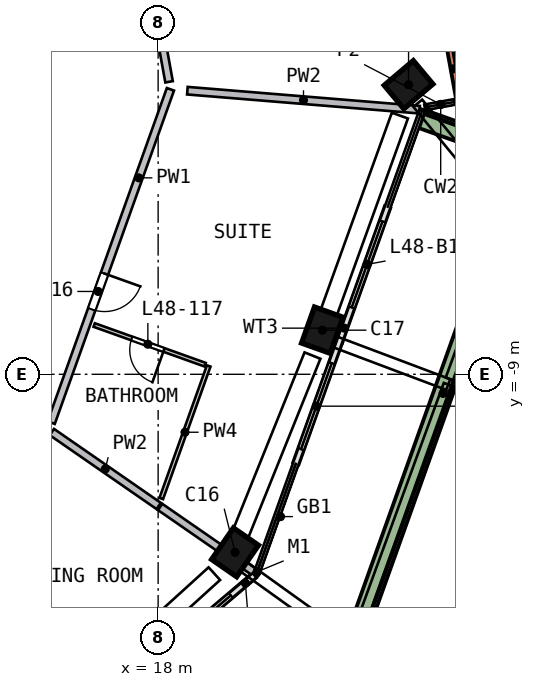
"""IFC4 building model, lengths in metres.
Left out: names, types, materials, properties, quantities, classifications, styles, units other than length and angle.
Written with IfcOpenShell. Run it as: python <this file> out.ifc"""

import sys

from ifc_helpers import new_model, si_unit, direction, frame, frame_2d, origin, origin_2d, place, context, subcontext, project, spatial, rectangle, extrude, element, fill, save


model = new_model("IFC4")
c1 = context("Model", 3, precision=1e-05, world=origin(), true_north=direction((0.0, 1.0)))
c2 = subcontext(c1, "Body", "Model", "MODEL_VIEW")
j1 = project(units=[si_unit("LENGTHUNIT", "METRE"), si_unit("PLANEANGLEUNIT", "RADIAN")], contexts=[c1])
p1 = place(None, origin())
s1 = spatial("IfcSite", under=j1, at=p1, CompositionType="ELEMENT")
p2 = place(p1, origin())
s2 = spatial("IfcBuilding", under=s1, at=p2, CompositionType="ELEMENT")
p3 = place(p2, frame((0.0, 0.0, 197.5)))
s3 = spatial("IfcBuildingStorey", under=s2, at=p3, CompositionType="ELEMENT", Elevation=197.5)
p4 = place(p3, frame((19.946, -13.801, 0.0), z_axis=(0.064772376, 0.095410014, 0.99332848), x_axis=(-0.56488901, -0.817069655, 0.115315158)))
e1 = element("IfcColumn", 1, at=p4, inside=s3, PredefinedType="COLUMN", context=c2, shape_type="SweptSolid", body=[
    extrude(rectangle(XDim=1.0, YDim=0.8, at=origin_2d()), origin(), (0.0, 0.0, 1.0), 3.211),
])
p5 = place(p3, frame((22.276, -7.967, 0.0), z_axis=(0.037035652, 0.106239847, 0.99365057), x_axis=(0.33503593, 0.935464206, -0.112506199)))
e2 = element("IfcColumn", 2, at=p5, inside=s3, PredefinedType="COLUMN", context=c2, shape_type="SweptSolid", body=[
    extrude(rectangle(XDim=1.0, YDim=0.8, at=origin_2d()), origin(), (0.0, 0.0, 1.0), 3.21),
])
p6 = place(p3, frame((24.582, -1.521, 0.0), z_axis=(0.006232678, 0.116900718, 0.993124049), x_axis=(-0.764322175, -0.639838763, 0.080112233)))
e3 = element("IfcColumn", 3, at=p6, inside=s3, PredefinedType="COLUMN", context=c2, shape_type="SweptSolid", body=[
    extrude(rectangle(XDim=1.0, YDim=0.8, at=origin_2d()), origin(), (0.0, 0.0, 1.0), 3.212),
])
p7 = place(p3, frame((25.94, -1.883, 0.0), z_axis=(0.0, 0.0, 1.0), x_axis=(-0.179160422, 0.983819873, 0.0)))
e4 = element("IfcWall", 4, at=p7, inside=s3, PredefinedType="SOLIDWALL", context=c2, shape_type="SweptSolid", body=[
    extrude(rectangle(XDim=1.875, YDim=0.15, at=frame_2d((0.938, 0.0))), origin(), (0.0, 0.0, 1.0), 3.19),
])
p8 = place(p3, frame((17.776, -16.632, 0.0), z_axis=(0.0, 0.0, 1.0), x_axis=(0.762428215, 0.647072806, 0.0)))
e5 = element("IfcWall", 5, at=p8, inside=s3, PredefinedType="SOLIDWALL", context=c2, shape_type="SweptSolid", body=[
    extrude(rectangle(XDim=3.608, YDim=0.15, at=frame_2d((1.804, 0.0))), origin(), (0.0, 0.0, 1.0), 2.475),
])
p9 = place(p8, frame((0.4, 0.0, 0.0)))
e6 = element("IfcOpeningElement", 6, at=p9, cuts=e5, PredefinedType="OPENING", context=c2, shape_type="SweptSolid", body=[
    extrude(rectangle(XDim=2.4, YDim=2.4, at=frame_2d((1.2, 1.2))), frame((0.0, 0.085, 0.0), z_axis=(0.0, -1.0, 0.0), x_axis=(1.0, 0.0, 0.0)), (0.0, 0.0, 1.0), 0.17),
])
p10 = place(p3, frame((21.626, -11.345, 0.0), z_axis=(0.0, 0.0, 1.0), x_axis=(0.336768495, 0.941587479, 0.0)))
e7 = element("IfcWall", 7, at=p10, inside=s3, PredefinedType="SOLIDWALL", context=c2, shape_type="SweptSolid", body=[
    extrude(rectangle(XDim=3.4, YDim=0.15, at=frame_2d((1.7, 0.0))), origin(), (0.0, 0.0, 1.0), 2.475),
])
p11 = place(p10, frame((0.4, 0.0, 0.0)))
e8 = element("IfcOpeningElement", 8, at=p11, cuts=e7, PredefinedType="OPENING", context=c2, shape_type="SweptSolid", body=[
    extrude(rectangle(XDim=2.4, YDim=2.4, at=frame_2d((1.2, 1.2))), frame((0.0, 0.085, 0.0), z_axis=(0.0, -1.0, 0.0), x_axis=(1.0, 0.0, 0.0)), (0.0, 0.0, 1.0), 0.17),
])
p12 = place(p3, frame((22.771, -8.144, 0.0), z_axis=(0.0, 0.0, 1.0), x_axis=(0.336755785, 0.941592025, 0.0)))
e9 = element("IfcWall", 9, at=p12, inside=s3, PredefinedType="SOLIDWALL", context=c2, shape_type="SweptSolid", body=[
    extrude(rectangle(XDim=3.761, YDim=0.15, at=frame_2d((1.881, 0.0))), origin(), (0.0, 0.0, 1.0), 2.475),
])
p13 = place(p12, frame((0.961, 0.0, 0.0)))
e10 = element("IfcOpeningElement", 10, at=p13, cuts=e9, PredefinedType="OPENING", context=c2, shape_type="SweptSolid", body=[
    extrude(rectangle(XDim=2.4, YDim=2.4, at=frame_2d((1.2, 1.2))), frame((0.0, 0.085, 0.0), z_axis=(0.0, -1.0, 0.0), x_axis=(1.0, 0.0, 0.0)), (0.0, 0.0, 1.0), 0.17),
])
p14 = place(p3, frame((23.187, -15.964, 0.0), z_axis=(0.0, 0.0, 1.0), x_axis=(0.33676461, 0.941588869, 0.0)))
e11 = element("IfcWall", 11, at=p14, inside=s3, PredefinedType="SOLIDWALL", context=c2, shape_type="SweptSolid", body=[
    extrude(rectangle(XDim=13.723, YDim=0.5, at=frame_2d((6.862, 0.0))), origin(), (0.0, 0.0, 1.0), 0.7),
])
p15 = place(p3, frame((27.489, -3.194, 0.0), z_axis=(0.0, 0.0, 1.0), x_axis=(-0.94159448, 0.336748919, 0.0)))
e12 = element("IfcWall", 12, at=p15, inside=s3, PredefinedType="SOLIDWALL", context=c2, shape_type="SweptSolid", body=[
    extrude(rectangle(XDim=2.699, YDim=0.5, at=frame_2d((1.35, 0.0))), origin(), (0.0, 0.0, 1.0), 0.7),
])
p16 = place(p3, frame((18.323, -1.5, 0.0), z_axis=(0.0, 0.0, 1.0), x_axis=(-0.336758012, -0.941591228, 0.0)))
e13 = element("IfcWall", 13, at=p16, inside=s3, PredefinedType="SOLIDWALL", context=c2, shape_type="SweptSolid", body=[
    extrude(rectangle(XDim=9.317, YDim=0.2, at=frame_2d((4.658, 0.0))), origin(), (0.0, 0.0, 1.0), 3.19),
])
p17 = place(p16, frame((5.15, 0.0, 0.0)))
e14 = element("IfcOpeningElement", 14, at=p17, cuts=e13, PredefinedType="OPENING", context=c2, shape_type="SweptSolid", body=[
    extrude(rectangle(XDim=1.0, YDim=2.1, at=frame_2d((0.5, 1.05))), frame((0.0, 0.11, 0.0), z_axis=(0.0, -1.0, 0.0), x_axis=(1.0, 0.0, 0.0)), (0.0, 0.0, 1.0), 0.22),
])
p18 = place(p3, frame((16.619, 7.863, 0.0), z_axis=(0.0, 0.0, 1.0), x_axis=(0.179134481, -0.983824597, 0.0)))
e15 = element("IfcWall", 15, at=p18, inside=s3, PredefinedType="SOLIDWALL", context=c2, shape_type="SweptSolid", body=[
    extrude(rectangle(XDim=9.317, YDim=0.2, at=frame_2d((4.658, 0.0))), origin(), (0.0, 0.0, 1.0), 3.19),
])
p19 = place(p18, frame((3.869, 0.0, 0.0)))
e16 = element("IfcOpeningElement", 16, at=p19, cuts=e15, PredefinedType="OPENING", context=c2, shape_type="SweptSolid", body=[
    extrude(rectangle(XDim=1.8, YDim=2.1, at=frame_2d((0.9, 1.05))), frame((0.0, 0.11, 0.0), z_axis=(0.0, -1.0, 0.0), x_axis=(1.0, 0.0, 0.0)), (0.0, 0.0, 1.0), 0.22),
])
p20 = place(p3, frame((15.204, -10.52, 0.0), z_axis=(0.0, 0.0, 1.0), x_axis=(0.8223567, -0.568972282, 0.0)))
e17 = element("IfcWall", 17, at=p20, inside=s3, PredefinedType="SOLIDWALL", context=c2, shape_type="SweptSolid", body=[
    extrude(rectangle(XDim=3.418, YDim=0.2, at=frame_2d((1.709, 0.0))), origin(), (0.0, 0.0, 1.0), 3.19),
])
p21 = place(p3, frame((18.052, -12.491, 0.0), z_axis=(0.0, 0.0, 1.0), x_axis=(0.822373098, -0.568948581, 0.0)))
e18 = element("IfcWall", 18, at=p21, inside=s3, PredefinedType="SOLIDWALL", context=c2, shape_type="SweptSolid", body=[
    extrude(rectangle(XDim=3.011, YDim=0.2, at=frame_2d((1.506, 0.0))), origin(), (0.0, 0.0, 1.0), 3.19),
])
p22 = place(p3, frame((24.881, -2.037, 0.0), z_axis=(0.0, 0.0, 1.0), x_axis=(-0.996666868, 0.081579132, 0.0)))
e19 = element("IfcWall", 19, at=p22, inside=s3, PredefinedType="SOLIDWALL", context=c2, shape_type="SweptSolid", body=[
    extrude(rectangle(XDim=6.132, YDim=0.2, at=frame_2d((3.066, 0.0))), origin(), (0.0, 0.0, 1.0), 3.19),
])
p23 = place(p3, frame((15.599, -18.381, 0.0), z_axis=(0.0, 0.0, 1.0), x_axis=(-0.64704669, 0.762450379, 0.0)))
e20 = element("IfcWall", 20, at=p23, inside=s3, PredefinedType="PARTITIONING", context=c2, shape_type="SweptSolid", body=[
    extrude(rectangle(XDim=6.15, YDim=0.1, at=frame_2d((3.075, 0.0))), origin(), (0.0, 0.0, 1.0), 3.19),
])
p24 = place(p23, frame((1.8, 0.0, 0.0)))
e21 = element("IfcOpeningElement", 21, at=p24, cuts=e20, PredefinedType="OPENING", context=c2, shape_type="SweptSolid", body=[
    extrude(rectangle(XDim=1.0, YDim=2.1, at=frame_2d((0.5, 1.05))), frame((0.0, 0.06, 0.0), z_axis=(0.0, -1.0, 0.0), x_axis=(1.0, 0.0, 0.0)), (0.0, 0.0, 1.0), 0.12),
])
p25 = place(p3, frame((19.236, -8.747, 0.0), z_axis=(0.0, 0.0, 1.0), x_axis=(-0.941592149, 0.336755439, 0.0)))
e22 = element("IfcWall", 22, at=p25, inside=s3, PredefinedType="PARTITIONING", context=c2, shape_type="SweptSolid", body=[
    extrude(rectangle(XDim=3.1, YDim=0.1, at=frame_2d((1.55, 0.0))), origin(), (0.0, 0.0, 1.0), 3.19),
])
p26 = place(p25, frame((1.15, 0.0, 0.0)))
e23 = element("IfcOpeningElement", 23, at=p26, cuts=e22, PredefinedType="OPENING", context=c2, shape_type="SweptSolid", body=[
    extrude(rectangle(XDim=0.9, YDim=2.1, at=frame_2d((0.45, 1.05))), frame((0.0, 0.06, 0.0), z_axis=(0.0, -1.0, 0.0), x_axis=(1.0, 0.0, 0.0)), (0.0, 0.0, 1.0), 0.12),
])
p27 = place(p3, frame((19.33, -8.781, 0.0), z_axis=(0.0, 0.0, 1.0), x_axis=(-0.336737198, -0.941598672, 0.0)))
e24 = element("IfcWall", 24, at=p27, inside=s3, PredefinedType="PARTITIONING", context=c2, shape_type="SweptSolid", body=[
    extrude(rectangle(XDim=3.704, YDim=0.1, at=frame_2d((1.852, 0.0))), origin(), (0.0, 0.0, 1.0), 3.19),
])
p28 = place(p9, origin())
e25 = element("IfcDoor", 25, at=p28, inside=s3, OperationType="SLIDING_TO_RIGHT", PredefinedType="DOOR", context=c2, shape_type="SweptSolid", body=[
    extrude(rectangle(XDim=2.4, YDim=2.4, at=frame_2d((1.2, 1.2))), frame((0.0, 0.025, 0.0), z_axis=(0.0, -1.0, 0.0), x_axis=(1.0, 0.0, 0.0)), (0.0, 0.0, 1.0), 0.05),
])
fill(e6, e25)
p29 = place(p11, origin())
e26 = element("IfcDoor", 26, at=p29, inside=s3, OperationType="SLIDING_TO_RIGHT", PredefinedType="DOOR", context=c2, shape_type="SweptSolid", body=[
    extrude(rectangle(XDim=2.4, YDim=2.4, at=frame_2d((1.2, 1.2))), frame((0.0, 0.025, 0.0), z_axis=(0.0, -1.0, 0.0), x_axis=(1.0, 0.0, 0.0)), (0.0, 0.0, 1.0), 0.05),
])
fill(e8, e26)
p30 = place(p13, origin())
e27 = element("IfcDoor", 27, at=p30, inside=s3, OperationType="SLIDING_TO_LEFT", PredefinedType="DOOR", context=c2, shape_type="SweptSolid", body=[
    extrude(rectangle(XDim=2.4, YDim=2.4, at=frame_2d((1.2, 1.2))), frame((0.0, 0.025, 0.0), z_axis=(0.0, -1.0, 0.0), x_axis=(1.0, 0.0, 0.0)), (0.0, 0.0, 1.0), 0.05),
])
fill(e10, e27)
p31 = place(p17, origin())
e28 = element("IfcDoor", 28, at=p31, inside=s3, OperationType="SINGLE_SWING_LEFT", PredefinedType="DOOR", context=c2, shape_type="SweptSolid", body=[
    extrude(rectangle(XDim=1.0, YDim=2.1, at=frame_2d((0.5, 1.05))), frame((0.0, 0.025, 0.0), z_axis=(0.0, -1.0, 0.0), x_axis=(1.0, 0.0, 0.0)), (0.0, 0.0, 1.0), 0.05),
])
fill(e14, e28)
p32 = place(p26, origin())
e29 = element("IfcDoor", 29, at=p32, inside=s3, OperationType="SINGLE_SWING_LEFT", PredefinedType="DOOR", context=c2, shape_type="SweptSolid", body=[
    extrude(rectangle(XDim=0.9, YDim=2.1, at=frame_2d((0.45, 1.05))), frame((0.0, 0.025, 0.0), z_axis=(0.0, -1.0, 0.0), x_axis=(1.0, 0.0, 0.0)), (0.0, 0.0, 1.0), 0.05),
])
fill(e23, e29)
save(model, sys.argv[1])
